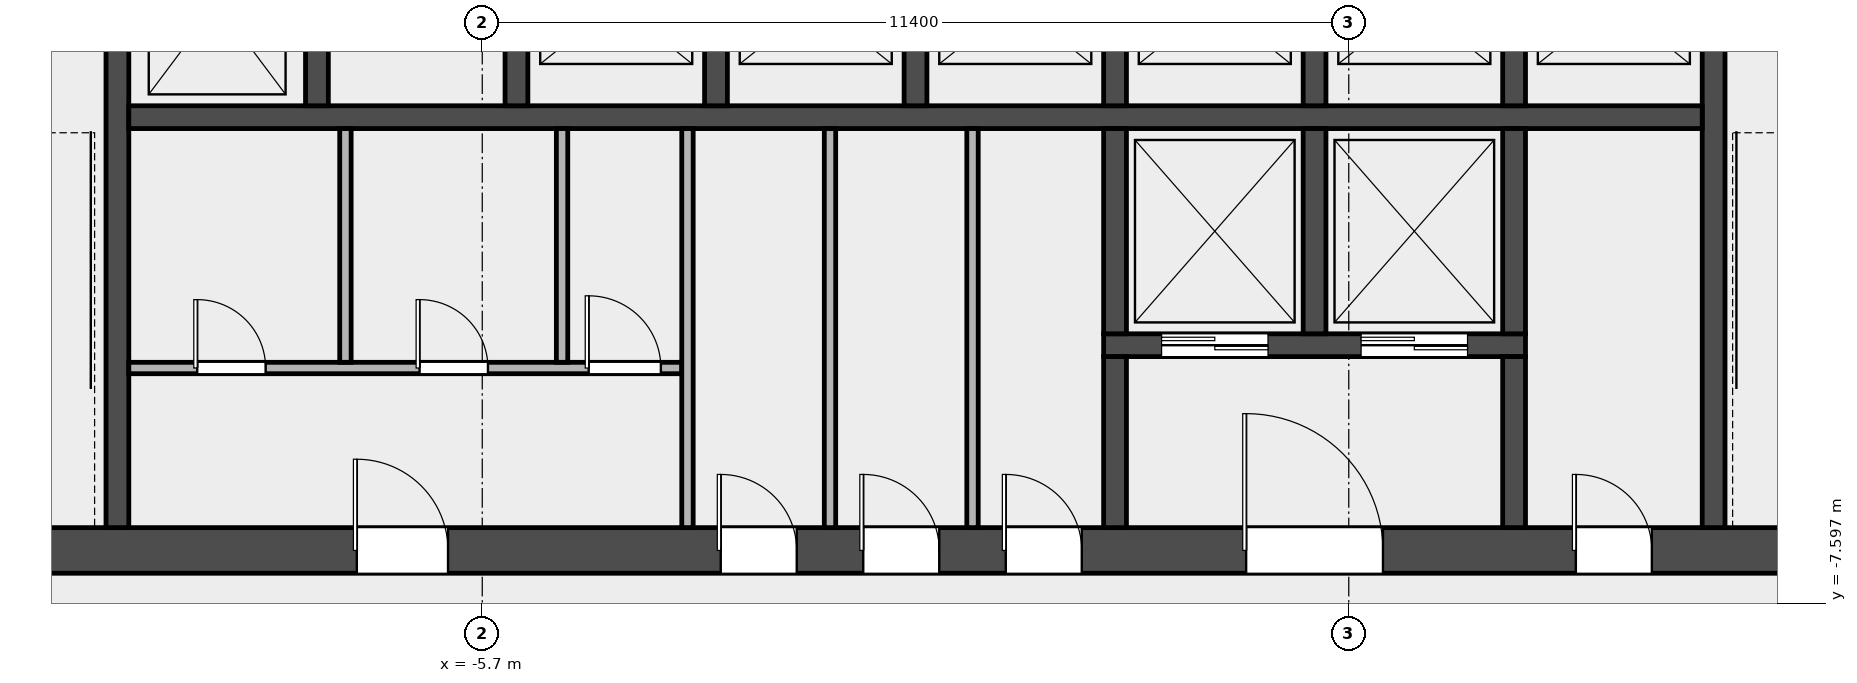
"""IFC4 building model, lengths in metres.
Left out: names, types, materials, properties, quantities, classifications, styles, units other than length and angle.
Written with IfcOpenShell. Run it as: python <this file> out.ifc"""

import sys

from ifc_helpers import new_model, si_unit, direction, frame, frame_2d, origin, place, context, subcontext, project, spatial, rectangle, extrude, element, fill, save


model = new_model("IFC4")
c1 = context("Model", 3, precision=1e-05, world=origin(), true_north=direction((0.0, 1.0)))
c2 = subcontext(c1, "Body", "Model", "MODEL_VIEW")
j1 = project(units=[si_unit("LENGTHUNIT", "METRE"), si_unit("PLANEANGLEUNIT", "RADIAN")], contexts=[c1])
p1 = place(None, origin())
s1 = spatial("IfcSite", under=j1, at=p1, CompositionType="ELEMENT")
p2 = place(p1, origin())
s2 = spatial("IfcBuilding", under=s1, at=p2, CompositionType="ELEMENT")
p3 = place(p2, frame((0.0, 0.0, 112.6)))
s3 = spatial("IfcBuildingStorey", under=s2, at=p3, CompositionType="ELEMENT", Elevation=112.6)
p4 = place(p3, frame((-14.4, -6.9, 0.0), z_axis=(0.0, 0.0, 1.0), x_axis=(1.0, 0.0, 0.0)))
e1 = element("IfcWall", 1, at=p4, inside=s3, PredefinedType="SHEAR", context=c2, shape_type="SweptSolid", body=[
    extrude(rectangle(XDim=28.8, YDim=0.6, at=frame_2d((14.4, 0.0))), origin(), (0.0, 0.0, 1.0), 4.2),
])
p5 = place(p4, frame((7.05, 0.0, 0.0)))
e2 = element("IfcOpeningElement", 2, at=p5, cuts=e1, PredefinedType="OPENING", context=c2, shape_type="SweptSolid", body=[
    extrude(rectangle(XDim=1.2, YDim=2.1, at=frame_2d((0.6, 1.05))), frame((0.0, 0.312, 0.0), z_axis=(0.0, -1.0, 0.0), x_axis=(1.0, 0.0, 0.0)), (0.0, 0.0, 1.0), 0.624),
])
p6 = place(p4, frame((11.837, 0.0, 0.0)))
e3 = element("IfcOpeningElement", 3, at=p6, cuts=e1, PredefinedType="OPENING", context=c2, shape_type="SweptSolid", body=[
    extrude(rectangle(XDim=1.0, YDim=2.1, at=frame_2d((0.5, 1.05))), frame((0.0, 0.312, 0.0), z_axis=(0.0, -1.0, 0.0), x_axis=(1.0, 0.0, 0.0)), (0.0, 0.0, 1.0), 0.624),
])
p7 = place(p4, frame((13.712, 0.0, 0.0)))
e4 = element("IfcOpeningElement", 4, at=p7, cuts=e1, PredefinedType="OPENING", context=c2, shape_type="SweptSolid", body=[
    extrude(rectangle(XDim=1.0, YDim=2.1, at=frame_2d((0.5, 1.05))), frame((0.0, 0.312, 0.0), z_axis=(0.0, -1.0, 0.0), x_axis=(1.0, 0.0, 0.0)), (0.0, 0.0, 1.0), 0.624),
])
p8 = place(p4, frame((15.587, 0.0, 0.0)))
e5 = element("IfcOpeningElement", 5, at=p8, cuts=e1, PredefinedType="OPENING", context=c2, shape_type="SweptSolid", body=[
    extrude(rectangle(XDim=1.0, YDim=2.1, at=frame_2d((0.5, 1.05))), frame((0.0, 0.312, 0.0), z_axis=(0.0, -1.0, 0.0), x_axis=(1.0, 0.0, 0.0)), (0.0, 0.0, 1.0), 0.624),
])
p9 = place(p4, frame((18.75, 0.0, 0.0)))
e6 = element("IfcOpeningElement", 6, at=p9, cuts=e1, PredefinedType="OPENING", context=c2, shape_type="SweptSolid", body=[
    extrude(rectangle(XDim=1.8, YDim=2.1, at=frame_2d((0.9, 1.05))), frame((0.0, 0.312, 0.0), z_axis=(0.0, -1.0, 0.0), x_axis=(1.0, 0.0, 0.0)), (0.0, 0.0, 1.0), 0.624),
])
p10 = place(p4, frame((23.087, 0.0, 0.0)))
e7 = element("IfcOpeningElement", 7, at=p10, cuts=e1, PredefinedType="OPENING", context=c2, shape_type="SweptSolid", body=[
    extrude(rectangle(XDim=1.0, YDim=2.1, at=frame_2d((0.5, 1.05))), frame((0.0, 0.312, 0.0), z_axis=(0.0, -1.0, 0.0), x_axis=(1.0, 0.0, 0.0)), (0.0, 0.0, 1.0), 0.624),
])
for number, where, z_axis, x_axis in (
    (8, (-10.5, -6.6, 0.0), (0.0, 0.0, 1.0), (0.0, 1.0, 0.0)),
    (9, (10.5, -6.6, 0.0), (0.0, 0.0, 1.0), (0.0, 1.0, 0.0)),
):
    element("IfcWall", number, at=place(p3, frame(where, z_axis=z_axis, x_axis=x_axis)), inside=s3, PredefinedType="SHEAR", context=c2, shape_type="SweptSolid", body=[
        extrude(rectangle(XDim=8.55, YDim=0.3, at=frame_2d((4.275, 0.0))), origin(), (0.0, 0.0, 1.0), 4.2),
    ])
p11 = place(p3, frame((-10.35, -1.2, 0.0), z_axis=(0.0, 0.0, 1.0), x_axis=(1.0, 0.0, 0.0)))
e10 = element("IfcWall", 10, at=p11, inside=s3, PredefinedType="SOLIDWALL", context=c2, shape_type="SweptSolid", body=[
    extrude(rectangle(XDim=20.7, YDim=0.3, at=frame_2d((10.35, 0.0))), origin(), (0.0, 0.0, 1.0), 4.2),
])
for number, where, z_axis, x_axis in (
    (11, (-7.875, -1.05, 0.0), (0.0, 0.0, 1.0), (0.0, 1.0, 0.0)),
    (12, (-5.25, -1.05, 0.0), (0.0, 0.0, 1.0), (0.0, 1.0, 0.0)),
    (13, (-2.625, -1.05, 0.0), (0.0, 0.0, 1.0), (0.0, 1.0, 0.0)),
    (14, (0.0, -1.05, 0.0), (0.0, 0.0, 1.0), (0.0, 1.0, 0.0)),
    (15, (2.625, -1.05, 0.0), (0.0, 0.0, 1.0), (0.0, 1.0, 0.0)),
    (16, (5.25, -1.05, 0.0), (0.0, 0.0, 1.0), (0.0, 1.0, 0.0)),
    (17, (7.875, -1.05, 0.0), (0.0, 0.0, 1.0), (0.0, 1.0, 0.0)),
):
    element("IfcWall", number, at=place(p3, frame(where, z_axis=z_axis, x_axis=x_axis)), inside=s3, PredefinedType="SOLIDWALL", context=c2, shape_type="SweptSolid", body=[
        extrude(rectangle(XDim=2.7, YDim=0.3, at=frame_2d((1.35, 0.0))), origin(), (0.0, 0.0, 1.0), 4.2),
    ])
p12 = place(p3, frame((2.475, -4.2, 0.0), z_axis=(0.0, 0.0, 1.0), x_axis=(1.0, 0.0, 0.0)))
e18 = element("IfcWall", 18, at=p12, inside=s3, PredefinedType="SOLIDWALL", context=c2, shape_type="SweptSolid", body=[
    extrude(rectangle(XDim=5.55, YDim=0.3, at=frame_2d((2.775, 0.0))), origin(), (0.0, 0.0, 1.0), 4.2),
])
p13 = place(p12, frame((0.762, 0.0, 0.0)))
e19 = element("IfcOpeningElement", 19, at=p13, cuts=e18, PredefinedType="OPENING", context=c2, shape_type="SweptSolid", body=[
    extrude(rectangle(XDim=1.4, YDim=2.1, at=frame_2d((0.7, 1.05))), frame((0.0, 0.162, 0.0), z_axis=(0.0, -1.0, 0.0), x_axis=(1.0, 0.0, 0.0)), (0.0, 0.0, 1.0), 0.324),
])
p14 = place(p12, frame((3.387, 0.0, 0.0)))
e20 = element("IfcOpeningElement", 20, at=p14, cuts=e18, PredefinedType="OPENING", context=c2, shape_type="SweptSolid", body=[
    extrude(rectangle(XDim=1.4, YDim=2.1, at=frame_2d((0.7, 1.05))), frame((0.0, 0.162, 0.0), z_axis=(0.0, -1.0, 0.0), x_axis=(1.0, 0.0, 0.0)), (0.0, 0.0, 1.0), 0.324),
])
p15 = place(p3, frame((2.625, -4.05, 0.0), z_axis=(0.0, 0.0, 1.0), x_axis=(0.0, 1.0, 0.0)))
e21 = element("IfcWall", 21, at=p15, inside=s3, PredefinedType="SOLIDWALL", context=c2, shape_type="SweptSolid", body=[
    extrude(rectangle(XDim=2.7, YDim=0.3, at=frame_2d((1.35, 0.0))), origin(), (0.0, 0.0, 1.0), 4.2),
])
p16 = place(p3, frame((2.625, -6.6, 0.0), z_axis=(0.0, 0.0, 1.0), x_axis=(0.0, 1.0, 0.0)))
e22 = element("IfcWall", 22, at=p16, inside=s3, PredefinedType="SOLIDWALL", context=c2, shape_type="SweptSolid", body=[
    extrude(rectangle(XDim=2.25, YDim=0.3, at=frame_2d((1.125, 0.0))), origin(), (0.0, 0.0, 1.0), 4.2),
])
for number, where, z_axis, x_axis in (
    (23, (5.25, -4.05, 0.0), (0.0, 0.0, 1.0), (0.0, 1.0, 0.0)),
    (24, (7.875, -4.05, 0.0), (0.0, 0.0, 1.0), (0.0, 1.0, 0.0)),
):
    element("IfcWall", number, at=place(p3, frame(where, z_axis=z_axis, x_axis=x_axis)), inside=s3, PredefinedType="SOLIDWALL", context=c2, shape_type="SweptSolid", body=[
        extrude(rectangle(XDim=2.7, YDim=0.3, at=frame_2d((1.35, 0.0))), origin(), (0.0, 0.0, 1.0), 4.2),
    ])
p17 = place(p3, frame((7.875, -6.6, 0.0), z_axis=(0.0, 0.0, 1.0), x_axis=(0.0, 1.0, 0.0)))
e25 = element("IfcWall", 25, at=p17, inside=s3, PredefinedType="SOLIDWALL", context=c2, shape_type="SweptSolid", body=[
    extrude(rectangle(XDim=2.25, YDim=0.3, at=frame_2d((1.125, 0.0))), origin(), (0.0, 0.0, 1.0), 4.2),
])
p18 = place(p3, frame((-10.35, -4.5, 0.0), z_axis=(0.0, 0.0, 1.0), x_axis=(1.0, 0.0, 0.0)))
e26 = element("IfcWall", 26, at=p18, inside=s3, PredefinedType="PARTITIONING", context=c2, shape_type="SweptSolid", body=[
    extrude(rectangle(XDim=7.275, YDim=0.15, at=frame_2d((3.638, 0.0))), origin(), (0.0, 0.0, 1.0), 4.2),
])
p19 = place(p18, frame((0.9, 0.0, 0.0)))
e27 = element("IfcOpeningElement", 27, at=p19, cuts=e26, PredefinedType="OPENING", context=c2, shape_type="SweptSolid", body=[
    extrude(rectangle(XDim=0.9, YDim=2.1, at=frame_2d((0.45, 1.05))), frame((0.0, 0.087, 0.0), z_axis=(0.0, -1.0, 0.0), x_axis=(1.0, 0.0, 0.0)), (0.0, 0.0, 1.0), 0.174),
])
p20 = place(p18, frame((3.825, 0.0, 0.0)))
e28 = element("IfcOpeningElement", 28, at=p20, cuts=e26, PredefinedType="OPENING", context=c2, shape_type="SweptSolid", body=[
    extrude(rectangle(XDim=0.9, YDim=2.1, at=frame_2d((0.45, 1.05))), frame((0.0, 0.087, 0.0), z_axis=(0.0, -1.0, 0.0), x_axis=(1.0, 0.0, 0.0)), (0.0, 0.0, 1.0), 0.174),
])
p21 = place(p18, frame((6.05, 0.0, 0.0)))
e29 = element("IfcOpeningElement", 29, at=p21, cuts=e26, PredefinedType="OPENING", context=c2, shape_type="SweptSolid", body=[
    extrude(rectangle(XDim=0.95, YDim=2.1, at=frame_2d((0.475, 1.05))), frame((0.0, 0.087, 0.0), z_axis=(0.0, -1.0, 0.0), x_axis=(1.0, 0.0, 0.0)), (0.0, 0.0, 1.0), 0.174),
])
for number, where, z_axis, x_axis in (
    (30, (-7.5, -4.425, 0.0), (0.0, 0.0, 1.0), (0.0, 1.0, 0.0)),
    (31, (-4.65, -4.425, 0.0), (0.0, 0.0, 1.0), (0.0, 1.0, 0.0)),
):
    element("IfcWall", number, at=place(p3, frame(where, z_axis=z_axis, x_axis=x_axis)), inside=s3, PredefinedType="PARTITIONING", context=c2, shape_type="SweptSolid", body=[
        extrude(rectangle(XDim=3.075, YDim=0.15, at=frame_2d((1.538, 0.0))), origin(), (0.0, 0.0, 1.0), 4.2),
    ])
for number, where, z_axis, x_axis in (
    (32, (-3.0, -6.6, 0.0), (0.0, 0.0, 1.0), (0.0, 1.0, 0.0)),
    (33, (-1.125, -6.6, 0.0), (0.0, 0.0, 1.0), (0.0, 1.0, 0.0)),
    (34, (0.75, -6.6, 0.0), (0.0, 0.0, 1.0), (0.0, 1.0, 0.0)),
):
    element("IfcWall", number, at=place(p3, frame(where, z_axis=z_axis, x_axis=x_axis)), inside=s3, PredefinedType="PARTITIONING", context=c2, shape_type="SweptSolid", body=[
        extrude(rectangle(XDim=5.25, YDim=0.15, at=frame_2d((2.625, 0.0))), origin(), (0.0, 0.0, 1.0), 4.2),
    ])
p22 = place(p13, origin())
e35 = element("IfcDoor", 35, at=p22, inside=s3, OperationType="DOUBLE_DOOR_SLIDING", PredefinedType="DOOR", context=c2, shape_type="SweptSolid", body=[
    extrude(rectangle(XDim=1.4, YDim=2.1, at=frame_2d((0.7, 1.05))), frame((0.0, 0.025, 0.0), z_axis=(0.0, -1.0, 0.0), x_axis=(1.0, 0.0, 0.0)), (0.0, 0.0, 1.0), 0.05),
])
fill(e19, e35)
p23 = place(p14, origin())
e36 = element("IfcDoor", 36, at=p23, inside=s3, OperationType="DOUBLE_DOOR_SLIDING", PredefinedType="DOOR", context=c2, shape_type="SweptSolid", body=[
    extrude(rectangle(XDim=1.4, YDim=2.1, at=frame_2d((0.7, 1.05))), frame((0.0, 0.025, 0.0), z_axis=(0.0, -1.0, 0.0), x_axis=(1.0, 0.0, 0.0)), (0.0, 0.0, 1.0), 0.05),
])
fill(e20, e36)
p24 = place(p5, origin())
e37 = element("IfcDoor", 37, at=p24, inside=s3, OperationType="SINGLE_SWING_LEFT", PredefinedType="DOOR", context=c2, shape_type="SweptSolid", body=[
    extrude(rectangle(XDim=1.2, YDim=2.1, at=frame_2d((0.6, 1.05))), frame((0.0, 0.025, 0.0), z_axis=(0.0, -1.0, 0.0), x_axis=(1.0, 0.0, 0.0)), (0.0, 0.0, 1.0), 0.05),
])
fill(e2, e37)
p25 = place(p19, origin())
e38 = element("IfcDoor", 38, at=p25, inside=s3, OperationType="SINGLE_SWING_LEFT", PredefinedType="DOOR", context=c2, shape_type="SweptSolid", body=[
    extrude(rectangle(XDim=0.9, YDim=2.1, at=frame_2d((0.45, 1.05))), frame((0.0, 0.025, 0.0), z_axis=(0.0, -1.0, 0.0), x_axis=(1.0, 0.0, 0.0)), (0.0, 0.0, 1.0), 0.05),
])
fill(e27, e38)
p26 = place(p20, origin())
e39 = element("IfcDoor", 39, at=p26, inside=s3, OperationType="SINGLE_SWING_LEFT", PredefinedType="DOOR", context=c2, shape_type="SweptSolid", body=[
    extrude(rectangle(XDim=0.9, YDim=2.1, at=frame_2d((0.45, 1.05))), frame((0.0, 0.025, 0.0), z_axis=(0.0, -1.0, 0.0), x_axis=(1.0, 0.0, 0.0)), (0.0, 0.0, 1.0), 0.05),
])
fill(e28, e39)
p27 = place(p21, origin())
e40 = element("IfcDoor", 40, at=p27, inside=s3, OperationType="SINGLE_SWING_LEFT", PredefinedType="DOOR", context=c2, shape_type="SweptSolid", body=[
    extrude(rectangle(XDim=0.95, YDim=2.1, at=frame_2d((0.475, 1.05))), frame((0.0, 0.025, 0.0), z_axis=(0.0, -1.0, 0.0), x_axis=(1.0, 0.0, 0.0)), (0.0, 0.0, 1.0), 0.05),
])
fill(e29, e40)
p28 = place(p6, origin())
e41 = element("IfcDoor", 41, at=p28, inside=s3, OperationType="SINGLE_SWING_LEFT", PredefinedType="DOOR", context=c2, shape_type="SweptSolid", body=[
    extrude(rectangle(XDim=1.0, YDim=2.1, at=frame_2d((0.5, 1.05))), frame((0.0, 0.025, 0.0), z_axis=(0.0, -1.0, 0.0), x_axis=(1.0, 0.0, 0.0)), (0.0, 0.0, 1.0), 0.05),
])
fill(e3, e41)
p29 = place(p7, origin())
e42 = element("IfcDoor", 42, at=p29, inside=s3, OperationType="SINGLE_SWING_LEFT", PredefinedType="DOOR", context=c2, shape_type="SweptSolid", body=[
    extrude(rectangle(XDim=1.0, YDim=2.1, at=frame_2d((0.5, 1.05))), frame((0.0, 0.025, 0.0), z_axis=(0.0, -1.0, 0.0), x_axis=(1.0, 0.0, 0.0)), (0.0, 0.0, 1.0), 0.05),
])
fill(e4, e42)
p30 = place(p8, origin())
e43 = element("IfcDoor", 43, at=p30, inside=s3, OperationType="SINGLE_SWING_LEFT", PredefinedType="DOOR", context=c2, shape_type="SweptSolid", body=[
    extrude(rectangle(XDim=1.0, YDim=2.1, at=frame_2d((0.5, 1.05))), frame((0.0, 0.025, 0.0), z_axis=(0.0, -1.0, 0.0), x_axis=(1.0, 0.0, 0.0)), (0.0, 0.0, 1.0), 0.05),
])
fill(e5, e43)
p31 = place(p9, origin())
e44 = element("IfcDoor", 44, at=p31, inside=s3, OperationType="DOUBLE_DOOR_SINGLE_SWING", PredefinedType="DOOR", context=c2, shape_type="SweptSolid", body=[
    extrude(rectangle(XDim=1.8, YDim=2.1, at=frame_2d((0.9, 1.05))), frame((0.0, 0.025, 0.0), z_axis=(0.0, -1.0, 0.0), x_axis=(1.0, 0.0, 0.0)), (0.0, 0.0, 1.0), 0.05),
])
fill(e6, e44)
p32 = place(p10, origin())
e45 = element("IfcDoor", 45, at=p32, inside=s3, OperationType="SINGLE_SWING_LEFT", PredefinedType="DOOR", context=c2, shape_type="SweptSolid", body=[
    extrude(rectangle(XDim=1.0, YDim=2.1, at=frame_2d((0.5, 1.05))), frame((0.0, 0.025, 0.0), z_axis=(0.0, -1.0, 0.0), x_axis=(1.0, 0.0, 0.0)), (0.0, 0.0, 1.0), 0.05),
])
fill(e7, e45)
save(model, sys.argv[1])
